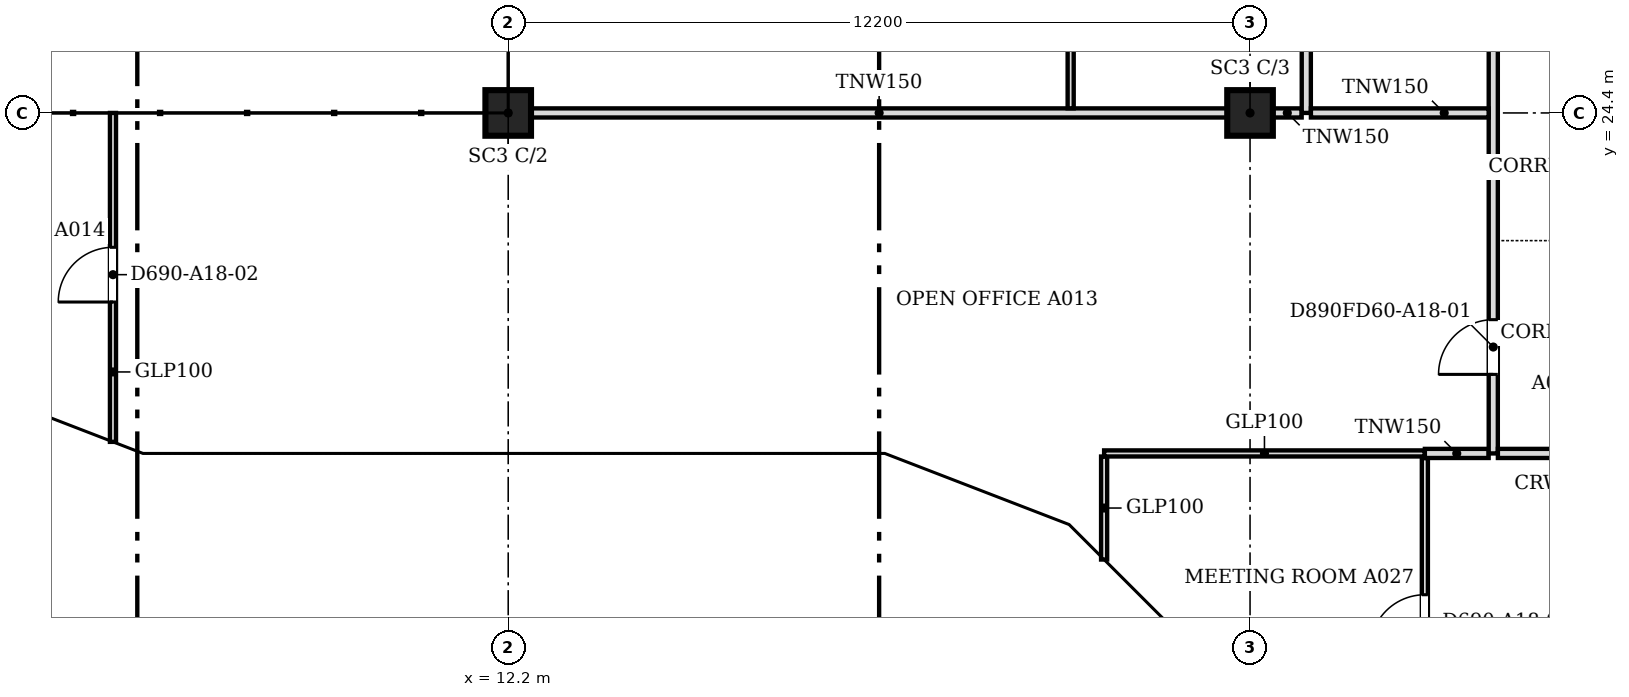
"""IFC4 building model, lengths in metres.
Left out: names, types, materials, properties, quantities, classifications, styles, units other than length and angle.
Written with IfcOpenShell. Run it as: python <this file> out.ifc"""

import sys

from ifc_helpers import new_model, si_unit, direction, frame, frame_2d, origin, origin_2d, place, context, subcontext, project, spatial, polyline, rectangle, outline, extrude, faceted_brep, source, transform, mapped, element, fill, save


model = new_model("IFC4")
c1 = context("Model", 3, precision=1e-05, world=origin(), true_north=direction((0.0, 1.0)))
c2 = subcontext(c1, "Body", "Model", "MODEL_VIEW")
j1 = project(units=[si_unit("LENGTHUNIT", "METRE"), si_unit("PLANEANGLEUNIT", "RADIAN")], contexts=[c1])
p1 = place(None, origin())
s1 = spatial("IfcSite", under=j1, at=p1, CompositionType="ELEMENT")
p2 = place(p1, origin())
s2 = spatial("IfcBuilding", under=s1, at=p2, CompositionType="ELEMENT")
p3 = place(p2, frame((0.0, 0.0, 197.9)))
s3 = spatial("IfcBuildingStorey", under=s2, at=p3, CompositionType="ELEMENT", Elevation=197.9)
for number, where, z_axis, x_axis in (
    (1, (12.2, 24.4, 0.0), (0.0, 0.0, 1.0), (1.0, 0.0, 0.0)),
    (2, (24.4, 24.4, 0.0), (0.0, 0.0, 1.0), (1.0, 0.0, 0.0)),
):
    element("IfcColumn", number, at=place(p3, frame(where, z_axis=z_axis, x_axis=x_axis)), inside=s3, PredefinedType="COLUMN", context=c2, shape_type="SweptSolid", body=[
        extrude(rectangle(XDim=0.75, YDim=0.75, at=origin_2d()), origin(), (0.0, 0.0, 1.0), 3.6),
    ])
m1 = source(origin(), c2, "Body", "Brep", [
    faceted_brep([(2.997, -0.25, 3.741), (2.95, -0.25, 3.8), (0.0, -0.25, 0.0), (2.997, -0.25, 0.0), (0.053, 0.25, 0.068), (2.904, 0.25, 3.74), (2.904, 0.25, 0.0), (0.053, 0.25, 0.0), (2.95, 0.0, 3.8), (0.0, 0.0, 0.0)], [[[0, 1, 2, 3]], [[4, 5, 6, 7]], [[8, 1, 0]], [[5, 4, 9, 2, 1, 8]], [[7, 6, 3, 2, 9]], [[7, 9, 4]], [[3, 6, 5, 8, 0]]]),
])
p4 = place(p3, frame((3.394, 19.612, 0.0), z_axis=(0.0, 0.0, 1.0), x_axis=(0.932990326376, -0.359901446078, 0.0)))
e3 = element("IfcWall", 3, at=p4, inside=s3, PredefinedType="SOLIDWALL", context=c2, shape_type="MappedRepresentation", body=[
    mapped(m1, transform((0.0, 0.0, 0.0), scale=1.0)),
])
m2 = source(origin(), c2, "Body", "SweptSolid", [
    extrude(outline(polyline([(2.75, 3.135), (0.511, 0.25), (2.75, 0.25), (2.75, 3.135)])), frame((0.0, 0.26, 0.0), z_axis=(0.0, -1.0, 0.0), x_axis=(1.0, 0.0, 0.0)), (0.0, 0.0, 1.0), 0.52),
])
p5 = place(p4, origin())
e4 = element("IfcOpeningElement", 4, at=p5, cuts=e3, PredefinedType="OPENING", context=c2, shape_type="MappedRepresentation", body=[
    mapped(m2, transform((0.0, 0.0, 0.0), scale=1.0)),
])
m3 = source(origin(), c2, "Body", "Brep", [
    faceted_brep([(3.05, -0.25, 0.0), (0.047, -0.25, 3.8), (0.0, -0.25, 3.74), (0.0, -0.25, 0.0), (0.093, 0.25, 3.741), (3.05, 0.25, 0.0), (0.093, 0.25, 0.0), (0.047, 0.0, 3.8)], [[[0, 1, 2, 3]], [[4, 5, 6]], [[5, 4, 7, 1, 0]], [[2, 1, 7]], [[6, 5, 0, 3]], [[6, 3, 2, 7, 4]]]),
])
p6 = place(p3, frame((6.1, 18.55, 0.0), z_axis=(0.0, 0.0, 1.0), x_axis=(1.0, 0.0, 0.0)))
e5 = element("IfcWall", 5, at=p6, inside=s3, PredefinedType="SOLIDWALL", context=c2, shape_type="MappedRepresentation", body=[
    mapped(m3, transform((0.0, 0.0, 0.0), scale=1.0)),
])
m4 = source(origin(), c2, "Body", "SweptSolid", [
    extrude(outline(polyline([(2.534, 0.25), (0.247, 3.144), (0.247, 0.25), (2.534, 0.25)])), frame((0.0, 0.26, 0.0), z_axis=(0.0, -1.0, 0.0), x_axis=(1.0, 0.0, 0.0)), (0.0, 0.0, 1.0), 0.52),
])
p7 = place(p6, origin())
e6 = element("IfcOpeningElement", 6, at=p7, cuts=e5, PredefinedType="OPENING", context=c2, shape_type="MappedRepresentation", body=[
    mapped(m4, transform((0.0, 0.0, 0.0), scale=1.0)),
])
m5 = source(origin(), c2, "Body", "SweptSolid", [
    extrude(outline(polyline([(6.1, 0.0), (3.05, 3.8), (0.0, 0.0), (6.1, 0.0)])), frame((0.0, 0.25, 0.0), z_axis=(0.0, -1.0, 0.0), x_axis=(1.0, 0.0, 0.0)), (0.0, 0.0, 1.0), 0.5),
])
p8 = place(p3, frame((9.15, 18.55, 0.0), z_axis=(0.0, 0.0, 1.0), x_axis=(1.0, 0.0, 0.0)))
e7 = element("IfcWall", 7, at=p8, inside=s3, PredefinedType="SOLIDWALL", context=c2, shape_type="MappedRepresentation", body=[
    mapped(m5, transform((0.0, 0.0, 0.0), scale=1.0)),
])
m6 = source(origin(), c2, "Body", "SweptSolid", [
    extrude(outline(polyline([(5.579, 0.25), (3.05, 3.401), (0.521, 0.25), (5.579, 0.25)])), frame((0.0, 0.26, 0.0), z_axis=(0.0, -1.0, 0.0), x_axis=(1.0, 0.0, 0.0)), (0.0, 0.0, 1.0), 0.52),
])
p9 = place(p8, origin())
e8 = element("IfcOpeningElement", 8, at=p9, cuts=e7, PredefinedType="OPENING", context=c2, shape_type="MappedRepresentation", body=[
    mapped(m6, transform((0.0, 0.0, 0.0), scale=1.0)),
])
m7 = source(origin(), c2, "Body", "Brep", [
    faceted_brep([(3.05, -0.25, 3.743), (0.0, -0.25, 0.0), (3.05, -0.25, 0.0), (0.0, 0.25, 0.0), (3.096, 0.25, 3.8), (3.143, 0.25, 3.744), (3.143, 0.25, 0.0), (3.096, -0.0, 3.8)], [[[0, 1, 2]], [[3, 4, 5, 6]], [[5, 4, 7]], [[4, 3, 1, 0, 7]], [[3, 6, 2, 1]], [[2, 6, 5, 7, 0]]]),
])
p10 = place(p3, frame((15.25, 18.55, 0.0), z_axis=(0.0, 0.0, 1.0), x_axis=(1.0, 0.0, 0.0)))
e9 = element("IfcWall", 9, at=p10, inside=s3, PredefinedType="SOLIDWALL", context=c2, shape_type="MappedRepresentation", body=[
    mapped(m7, transform((0.0, 0.0, 0.0), scale=1.0)),
])
m8 = source(origin(), c2, "Body", "SweptSolid", [
    extrude(outline(polyline([(2.896, 3.159), (0.526, 0.25), (2.896, 0.25), (2.896, 3.159)])), frame((0.0, 0.26, 0.0), z_axis=(0.0, -1.0, 0.0), x_axis=(1.0, 0.0, 0.0)), (0.0, 0.0, 1.0), 0.52),
])
p11 = place(p10, origin())
e10 = element("IfcOpeningElement", 10, at=p11, cuts=e9, PredefinedType="OPENING", context=c2, shape_type="MappedRepresentation", body=[
    mapped(m8, transform((0.0, 0.0, 0.0), scale=1.0)),
])
m9 = source(origin(), c2, "Body", "Brep", [
    faceted_brep([(3.143, -0.25, 0.064), (0.093, -0.25, 3.744), (0.093, -0.25, 0.0), (3.143, -0.25, 0.0), (0.0, 0.25, 3.743), (0.047, 0.25, 3.8), (3.196, 0.25, 0.0), (0.0, 0.25, 0.0), (0.047, 0.0, 3.8), (3.196, -0.0, 0.0)], [[[0, 1, 2, 3]], [[4, 5, 6, 7]], [[6, 5, 8, 1, 0, 9]], [[5, 4, 8]], [[7, 6, 9, 3, 2]], [[7, 2, 1, 8, 4]], [[3, 9, 0]]]),
])
p12 = place(p3, frame((18.303, 18.567, 0.0), z_axis=(0.0, 0.0, 1.0), x_axis=(0.932978940178, -0.359930961693, 0.0)))
e11 = element("IfcWall", 11, at=p12, inside=s3, PredefinedType="SOLIDWALL", context=c2, shape_type="MappedRepresentation", body=[
    mapped(m9, transform((0.0, 0.0, 0.0), scale=1.0)),
])
m10 = source(origin(), c2, "Body", "SweptSolid", [
    extrude(outline(polyline([(2.664, 0.25), (0.247, 3.167), (0.247, 0.25), (2.664, 0.25)])), frame((0.0, 0.26, 0.0), z_axis=(0.0, -1.0, 0.0), x_axis=(1.0, 0.0, 0.0)), (0.0, 0.0, 1.0), 0.52),
])
p13 = place(p12, origin())
e12 = element("IfcOpeningElement", 12, at=p13, cuts=e11, PredefinedType="OPENING", context=c2, shape_type="MappedRepresentation", body=[
    mapped(m10, transform((0.0, 0.0, 0.0), scale=1.0)),
])
m11 = source(origin(), c2, "Body", "Brep", [
    faceted_brep([(3.103, -0.25, 3.736), (0.053, -0.25, 0.064), (0.053, -0.25, 0.0), (3.103, -0.25, 0.0), (0.0, 0.25, 0.0), (3.156, 0.25, 3.8), (3.209, 0.25, 3.736), (3.209, 0.25, 0.0), (3.156, -0.0, 3.8), (0.0, 0.0, 0.0)], [[[0, 1, 2, 3]], [[4, 5, 6, 7]], [[6, 5, 8]], [[5, 4, 9, 1, 0, 8]], [[4, 7, 3, 2, 9]], [[9, 2, 1]], [[3, 7, 6, 8, 0]]]),
])
p14 = place(p3, frame((21.285, 17.417, 0.0), z_axis=(0.0, 0.0, 1.0), x_axis=(0.707106781187, -0.707106781187, 0.0)))
e13 = element("IfcWall", 13, at=p14, inside=s3, PredefinedType="SOLIDWALL", context=c2, shape_type="MappedRepresentation", body=[
    mapped(m11, transform((0.0, 0.0, 0.0), scale=1.0)),
])
m12 = source(origin(), c2, "Body", "SweptSolid", [
    extrude(outline(polyline([(2.956, 3.168), (0.533, 0.25), (2.956, 0.25), (2.956, 3.168)])), frame((0.0, 0.26, 0.0), z_axis=(0.0, -1.0, 0.0), x_axis=(1.0, 0.0, 0.0)), (0.0, 0.0, 1.0), 0.52),
])
p15 = place(p14, origin())
e14 = element("IfcOpeningElement", 14, at=p15, cuts=e13, PredefinedType="OPENING", context=c2, shape_type="MappedRepresentation", body=[
    mapped(m12, transform((0.0, 0.0, 0.0), scale=1.0)),
])
p16 = place(p2, frame((0.0, 0.0, 201.7)))
s4 = spatial("IfcBuildingStorey", under=s2, at=p16, CompositionType="ELEMENT", Elevation=201.7)
m13 = source(origin(), c2, "Body", "Brep", [
    faceted_brep([(0.053, -0.25, 0.0), (3.003, -0.25, 3.8), (0.053, -0.25, 7.6), (0.0, -0.25, 7.532), (0.0, -0.25, 0.068), (0.106, 0.25, 7.532), (2.957, 0.25, 3.86), (2.957, 0.25, 3.74), (0.106, 0.25, 0.068), (3.003, 0.0, 3.8), (0.053, 0.0, 0.0), (0.053, 0.0, 7.6)], [[[0, 1, 2, 3, 4]], [[5, 6, 7, 8]], [[8, 7, 9, 1, 0, 10]], [[6, 5, 11, 2, 1, 9]], [[3, 2, 11]], [[10, 0, 4]], [[8, 10, 4, 3, 11, 5]], [[9, 7, 6]]]),
])
p17 = place(p16, frame((3.344, 19.631, -3.8), z_axis=(0.0, 0.0, 1.0), x_axis=(0.933007896601, -0.359855894603, 0.0)))
e15 = element("IfcWall", 15, at=p17, inside=s4, PredefinedType="SOLIDWALL", context=c2, shape_type="MappedRepresentation", body=[
    mapped(m13, transform((0.0, 0.0, 0.0), scale=1.0)),
])
m14 = source(origin(), c2, "Body", "SweptSolid", [
    extrude(outline(polyline([(0.253, 0.665), (2.687, 3.8), (0.253, 6.935), (0.253, 0.665)])), frame((0.0, 0.26, 0.0), z_axis=(0.0, -1.0, 0.0), x_axis=(1.0, 0.0, 0.0)), (0.0, 0.0, 1.0), 0.52),
])
p18 = place(p17, origin())
e16 = element("IfcOpeningElement", 16, at=p18, cuts=e15, PredefinedType="OPENING", context=c2, shape_type="MappedRepresentation", body=[
    mapped(m14, transform((0.0, 0.0, 0.0), scale=1.0)),
])
m15 = source(origin(), c2, "Body", "Brep", [
    faceted_brep([(3.003, -0.25, 0.0), (6.053, -0.25, 3.8), (3.003, -0.25, 7.6), (0.0, -0.25, 3.8), (0.047, 0.25, 3.859), (3.003, 0.25, 7.6), (6.053, 0.25, 3.8), (3.003, 0.25, 0.0), (0.047, 0.25, 3.741), (0.0, 0.0, 3.8)], [[[0, 1, 2, 3]], [[4, 5, 6, 7, 8]], [[7, 6, 1, 0]], [[6, 5, 2, 1]], [[5, 4, 9, 3, 2]], [[8, 7, 0, 3, 9]], [[8, 9, 4]]]),
])
p19 = place(p16, frame((6.146, 18.55, -3.8), z_axis=(0.0, 0.0, 1.0), x_axis=(1.0, 0.0, 0.0)))
e17 = element("IfcWall", 17, at=p19, inside=s4, PredefinedType="SOLIDWALL", context=c2, shape_type="MappedRepresentation", body=[
    mapped(m15, transform((0.0, 0.0, 0.0), scale=1.0)),
])
m16 = source(origin(), c2, "Body", "SweptSolid", [
    extrude(outline(polyline([(3.005, 0.401), (5.733, 3.8), (3.005, 7.199), (0.319, 3.8), (3.005, 0.401)])), frame((0.0, 0.26, 0.0), z_axis=(0.0, -1.0, 0.0), x_axis=(1.0, 0.0, 0.0)), (0.0, 0.0, 1.0), 0.52),
])
p20 = place(p19, origin())
e18 = element("IfcOpeningElement", 18, at=p20, cuts=e17, PredefinedType="OPENING", context=c2, shape_type="MappedRepresentation", body=[
    mapped(m16, transform((0.0, 0.0, 0.0), scale=1.0)),
])
m17 = source(origin(), c2, "Body", "Brep", [
    faceted_brep([(3.05, -0.25, 0.0), (6.1, -0.25, 3.743), (6.1, -0.25, 3.857), (3.05, -0.25, 7.6), (0.0, -0.25, 3.8), (0.0, 0.25, 3.8), (3.05, 0.25, 7.6), (6.146, 0.25, 3.8), (3.05, 0.25, 0.0), (6.146, -0.0, 3.8)], [[[0, 1, 2, 3, 4]], [[5, 6, 7, 8]], [[8, 7, 9, 1, 0]], [[7, 6, 3, 2, 9]], [[6, 5, 4, 3]], [[5, 8, 0, 4]], [[1, 9, 2]]]),
])
p21 = place(p16, frame((12.2, 18.55, -3.8), z_axis=(0.0, 0.0, 1.0), x_axis=(1.0, 0.0, 0.0)))
e19 = element("IfcWall", 19, at=p21, inside=s4, PredefinedType="SOLIDWALL", context=c2, shape_type="MappedRepresentation", body=[
    mapped(m17, transform((0.0, 0.0, 0.0), scale=1.0)),
])
m18 = source(origin(), c2, "Body", "SweptSolid", [
    extrude(outline(polyline([(3.052, 0.398), (5.824, 3.8), (3.052, 7.203), (0.321, 3.8), (3.052, 0.398)])), frame((0.0, 0.26, 0.0), z_axis=(0.0, -1.0, 0.0), x_axis=(1.0, 0.0, 0.0)), (0.0, 0.0, 1.0), 0.52),
])
p22 = place(p21, origin())
e20 = element("IfcOpeningElement", 20, at=p22, cuts=e19, PredefinedType="OPENING", context=c2, shape_type="MappedRepresentation", body=[
    mapped(m18, transform((0.0, 0.0, 0.0), scale=1.0)),
])
m19 = source(origin(), c2, "Body", "Brep", [
    faceted_brep([(3.096, -0.25, 7.536), (0.047, -0.25, 3.856), (0.047, -0.25, 3.744), (3.096, -0.25, 0.064), (0.0, 0.25, 3.8), (3.149, 0.25, 7.6), (3.202, 0.25, 7.536), (3.202, 0.25, 0.064), (3.149, 0.25, 0.0), (3.149, -0.0, 0.0), (3.149, -0.0, 7.6), (0.0, 0.0, 3.8)], [[[0, 1, 2, 3]], [[4, 5, 6, 7, 8]], [[8, 7, 9]], [[6, 5, 10]], [[5, 4, 11, 1, 0, 10]], [[4, 8, 9, 3, 2, 11]], [[11, 2, 1]], [[3, 9, 7, 6, 10, 0]]]),
])
p23 = place(p16, frame((18.346, 18.55, -3.8), z_axis=(0.0, 0.0, 1.0), x_axis=(0.932985567668, -0.359913782069, 0.0)))
e21 = element("IfcWall", 21, at=p23, inside=s4, PredefinedType="SOLIDWALL", context=c2, shape_type="MappedRepresentation", body=[
    mapped(m19, transform((0.0, 0.0, 0.0), scale=1.0)),
])
m20 = source(origin(), c2, "Body", "SweptSolid", [
    extrude(outline(polyline([(2.949, 6.967), (0.325, 3.8), (2.949, 0.633), (2.949, 6.967)])), frame((0.0, 0.26, 0.0), z_axis=(0.0, -1.0, 0.0), x_axis=(1.0, 0.0, 0.0)), (0.0, 0.0, 1.0), 0.52),
])
p24 = place(p23, origin())
e22 = element("IfcOpeningElement", 22, at=p24, cuts=e21, PredefinedType="OPENING", context=c2, shape_type="MappedRepresentation", body=[
    mapped(m20, transform((0.0, 0.0, 0.0), scale=1.0)),
])
m21 = source(origin(), c2, "Body", "Brep", [
    faceted_brep([(0.106, -0.25, 0.064), (3.156, -0.25, 3.736), (3.156, -0.25, 3.864), (0.106, -0.25, 7.536), (0.0, 0.25, 7.536), (0.053, 0.25, 7.6), (3.209, 0.25, 3.8), (0.053, 0.25, 0.0), (0.0, 0.25, 0.064), (3.209, -0.0, 3.8), (0.053, 0.0, 0.0), (0.053, 0.0, 7.6)], [[[0, 1, 2, 3]], [[4, 5, 6, 7, 8]], [[7, 6, 9, 1, 0, 10]], [[6, 5, 11, 3, 2, 9]], [[5, 4, 11]], [[8, 7, 10]], [[8, 10, 0, 3, 11, 4]], [[1, 9, 2]]]),
])
p25 = place(p16, frame((21.248, 17.454, -3.8), z_axis=(0.0, 0.0, 1.0), x_axis=(0.707106781187, -0.707106781187, 0.0)))
e23 = element("IfcWall", 23, at=p25, inside=s4, PredefinedType="SOLIDWALL", context=c2, shape_type="MappedRepresentation", body=[
    mapped(m21, transform((0.0, 0.0, 0.0), scale=1.0)),
])
m22 = source(origin(), c2, "Body", "SweptSolid", [
    extrude(outline(polyline([(0.253, 0.632), (2.884, 3.8), (0.253, 6.968), (0.253, 0.632)])), frame((0.0, 0.26, 0.0), z_axis=(0.0, -1.0, 0.0), x_axis=(1.0, 0.0, 0.0)), (0.0, 0.0, 1.0), 0.52),
])
p26 = place(p25, origin())
e24 = element("IfcOpeningElement", 24, at=p26, cuts=e23, PredefinedType="OPENING", context=c2, shape_type="MappedRepresentation", body=[
    mapped(m22, transform((0.0, 0.0, 0.0), scale=1.0)),
])
p27 = place(p3, frame((27.275, 13.276, 0.0), z_axis=(0.0, 0.0, 1.0), x_axis=(0.0, 1.0, 0.0)))
e25 = element("IfcWall", 25, at=p27, inside=s3, PredefinedType="PARTITIONING", context=c2, shape_type="SweptSolid", body=[
    extrude(rectangle(XDim=5.448, YDim=0.1, at=frame_2d((2.724, 0.0))), origin(), (0.0, 0.0, 1.0), 3.067),
])
m23 = source(origin(), c2, "Body", "SweptSolid", [
    extrude(rectangle(XDim=0.9, YDim=2.1, at=frame_2d((0.45, 1.05))), frame((0.0, 0.06, 0.0), z_axis=(0.0, -1.0, 0.0), x_axis=(1.0, 0.0, 0.0)), (0.0, 0.0, 1.0), 0.12),
])
p28 = place(p27, frame((2.3, 0.0, 0.0)))
e26 = element("IfcOpeningElement", 26, at=p28, cuts=e25, PredefinedType="OPENING", context=c2, shape_type="MappedRepresentation", body=[
    mapped(m23, transform((0.0, 0.0, 0.0), scale=1.0)),
])
p29 = place(p3, frame((22.0, 17.055, 0.0), z_axis=(0.0, 0.0, 1.0), x_axis=(0.0, 1.0, 0.0)))
e27 = element("IfcWall", 27, at=p29, inside=s3, PredefinedType="PARTITIONING", context=c2, shape_type="SweptSolid", body=[
    extrude(rectangle(XDim=1.694, YDim=0.1, at=frame_2d((0.847, 0.0))), origin(), (0.0, 0.0, 1.0), 3.067),
])
p30 = place(p3, frame((22.0, 18.8, 0.0), z_axis=(0.0, 0.0, 1.0), x_axis=(1.0, 0.0, 0.0)))
e28 = element("IfcWall", 28, at=p30, inside=s3, PredefinedType="PARTITIONING", context=c2, shape_type="SweptSolid", body=[
    extrude(rectangle(XDim=5.274, YDim=0.1, at=frame_2d((2.637, 0.0))), origin(), (0.0, 0.0, 1.0), 3.067),
])
p31 = place(p3, frame((27.275, 18.8, 0.0), z_axis=(0.0, 0.0, 1.0), x_axis=(1.0, 0.0, 0.0)))
e29 = element("IfcWall", 29, at=p31, inside=s3, PredefinedType="PARTITIONING", context=c2, shape_type="SweptSolid", body=[
    extrude(rectangle(XDim=1.049, YDim=0.15, at=frame_2d((0.524, 0.0))), origin(), (0.0, 0.0, 1.0), 3.067),
])
p32 = place(p3, frame((28.4, 18.8, 0.0), z_axis=(0.0, 0.0, 1.0), x_axis=(0.0, 1.0, 0.0)))
e30 = element("IfcWall", 30, at=p32, inside=s3, PredefinedType="PARTITIONING", context=c2, shape_type="SweptSolid", body=[
    extrude(rectangle(XDim=26.9, YDim=0.15, at=frame_2d((13.45, 0.0))), origin(), (0.0, 0.0, 1.0), 3.067),
])
m24 = source(origin(), c2, "Body", "SweptSolid", [
    extrude(rectangle(XDim=0.9, YDim=2.1, at=frame_2d((0.45, 1.05))), frame((0.0, 0.085, 0.0), z_axis=(0.0, -1.0, 0.0), x_axis=(1.0, 0.0, 0.0)), (0.0, 0.0, 1.0), 0.17),
])
p33 = place(p32, frame((1.3, 0.0, 0.0)))
e31 = element("IfcOpeningElement", 31, at=p33, cuts=e30, PredefinedType="OPENING", context=c2, shape_type="MappedRepresentation", body=[
    mapped(m24, transform((0.0, 0.0, 0.0), scale=1.0)),
])
m25 = source(origin(), c2, "Body", "SweptSolid", [
    extrude(rectangle(XDim=1.0, YDim=2.1, at=frame_2d((0.5, 1.05))), frame((0.0, 0.085, 0.0), z_axis=(0.0, -1.0, 0.0), x_axis=(1.0, 0.0, 0.0)), (0.0, 0.0, 1.0), 0.17),
])
p34 = place(p32, frame((9.7, 0.0, 0.0)))
e32 = element("IfcOpeningElement", 32, at=p34, cuts=e30, PredefinedType="OPENING", context=c2, shape_type="MappedRepresentation", body=[
    mapped(m25, transform((0.0, 0.0, 0.0), scale=1.0)),
])
p35 = place(p32, frame((20.35, 0.0, 0.0)))
e33 = element("IfcOpeningElement", 33, at=p35, cuts=e30, PredefinedType="OPENING", context=c2, shape_type="MappedRepresentation", body=[
    mapped(m25, transform((0.0, 0.0, 0.0), scale=1.0)),
])
p36 = place(p3, frame((28.476, 18.8, 0.0), z_axis=(0.0, 0.0, 1.0), x_axis=(1.0, 0.0, 0.0)))
e34 = element("IfcWall", 34, at=p36, inside=s3, PredefinedType="PARTITIONING", context=c2, shape_type="SweptSolid", body=[
    extrude(rectangle(XDim=1.948, YDim=0.15, at=frame_2d((0.974, 0.0))), origin(), (0.0, 0.0, 1.0), 3.067),
])
p37 = place(p3, frame((5.7, 18.99, 0.0), z_axis=(0.0, 0.0, 1.0), x_axis=(0.0, 1.0, 0.0)))
e35 = element("IfcWall", 35, at=p37, inside=s3, PredefinedType="PARTITIONING", context=c2, shape_type="SweptSolid", body=[
    extrude(rectangle(XDim=5.41, YDim=0.1, at=frame_2d((2.705, 0.0))), origin(), (0.0, 0.0, 1.0), 3.067),
])
p38 = place(p37, frame((2.3, 0.0, 0.0)))
e36 = element("IfcOpeningElement", 36, at=p38, cuts=e35, PredefinedType="OPENING", context=c2, shape_type="MappedRepresentation", body=[
    mapped(m23, transform((0.0, 0.0, 0.0), scale=1.0)),
])
p39 = place(p3, frame((12.576, 24.4, 0.0), z_axis=(0.0, 0.0, 1.0), x_axis=(1.0, 0.0, 0.0)))
e37 = element("IfcWall", 37, at=p39, inside=s3, PredefinedType="PARTITIONING", context=c2, shape_type="SweptSolid", body=[
    extrude(rectangle(XDim=11.448, YDim=0.15, at=frame_2d((5.724, 0.0))), origin(), (0.0, 0.0, 1.0), 3.067),
])
p40 = place(p3, frame((24.776, 24.4, 0.0), z_axis=(0.0, 0.0, 1.0), x_axis=(1.0, 0.0, 0.0)))
e38 = element("IfcWall", 38, at=p40, inside=s3, PredefinedType="PARTITIONING", context=c2, shape_type="SweptSolid", body=[
    extrude(rectangle(XDim=0.473, YDim=0.15, at=frame_2d((0.237, 0.0))), origin(), (0.0, 0.0, 1.0), 3.067),
])
p41 = place(p3, frame((25.325, 24.4, 0.0), z_axis=(0.0, 0.0, 1.0), x_axis=(0.0, 1.0, 0.0)))
e39 = element("IfcWall", 39, at=p41, inside=s3, PredefinedType="PARTITIONING", context=c2, shape_type="SweptSolid", body=[
    extrude(rectangle(XDim=9.15, YDim=0.15, at=frame_2d((4.575, 0.0))), origin(), (0.0, 0.0, 1.0), 3.067),
])
p42 = place(p41, frame((4.1, 0.0, 0.0)))
e40 = element("IfcOpeningElement", 40, at=p42, cuts=e39, PredefinedType="OPENING", context=c2, shape_type="MappedRepresentation", body=[
    mapped(m24, transform((0.0, 0.0, 0.0), scale=1.0)),
])
p43 = place(p3, frame((25.401, 24.4, 0.0), z_axis=(0.0, 0.0, 1.0), x_axis=(1.0, 0.0, 0.0)))
e41 = element("IfcWall", 41, at=p43, inside=s3, PredefinedType="PARTITIONING", context=c2, shape_type="SweptSolid", body=[
    extrude(rectangle(XDim=2.923, YDim=0.15, at=frame_2d((1.461, 0.0))), origin(), (0.0, 0.0, 1.0), 3.067),
])
p44 = place(p3, frame((21.45, 24.476, 0.0), z_axis=(0.0, 0.0, 1.0), x_axis=(0.0, 1.0, 0.0)))
e42 = element("IfcWall", 42, at=p44, inside=s3, PredefinedType="PARTITIONING", context=c2, shape_type="SweptSolid", body=[
    extrude(rectangle(XDim=8.998, YDim=0.1, at=frame_2d((4.499, 0.0))), origin(), (0.0, 0.0, 1.0), 3.067),
])
p45 = place(p44, frame((4.0, 0.0, 0.0)))
e43 = element("IfcOpeningElement", 43, at=p45, cuts=e42, PredefinedType="OPENING", context=c2, shape_type="MappedRepresentation", body=[
    mapped(m23, transform((0.0, 0.0, 0.0), scale=1.0)),
])
m26 = source(origin(), c2, "Body", "SweptSolid", [
    extrude(rectangle(XDim=0.9, YDim=2.1, at=frame_2d((0.45, 1.05))), frame((0.0, 0.025, 0.0), z_axis=(0.0, -1.0, 0.0), x_axis=(1.0, 0.0, 0.0)), (0.0, 0.0, 1.0), 0.05),
])
p46 = place(p33, origin())
e44 = element("IfcDoor", 44, at=p46, inside=s3, OperationType="SINGLE_SWING_LEFT", PredefinedType="DOOR", context=c2, shape_type="MappedRepresentation", body=[
    mapped(m26, transform((0.0, 0.0, 0.0), scale=1.0)),
])
fill(e31, e44)
p47 = place(p38, origin())
e45 = element("IfcDoor", 45, at=p47, inside=s3, OperationType="SINGLE_SWING_LEFT", PredefinedType="DOOR", context=c2, shape_type="MappedRepresentation", body=[
    mapped(m26, transform((0.0, 0.0, 0.0), scale=1.0)),
])
fill(e36, e45)
p48 = place(p28, origin())
e46 = element("IfcDoor", 46, at=p48, inside=s3, OperationType="SINGLE_SWING_LEFT", PredefinedType="DOOR", context=c2, shape_type="MappedRepresentation", body=[
    mapped(m26, transform((0.0, 0.0, 0.0), scale=1.0)),
])
fill(e26, e46)
save(model, sys.argv[1])
